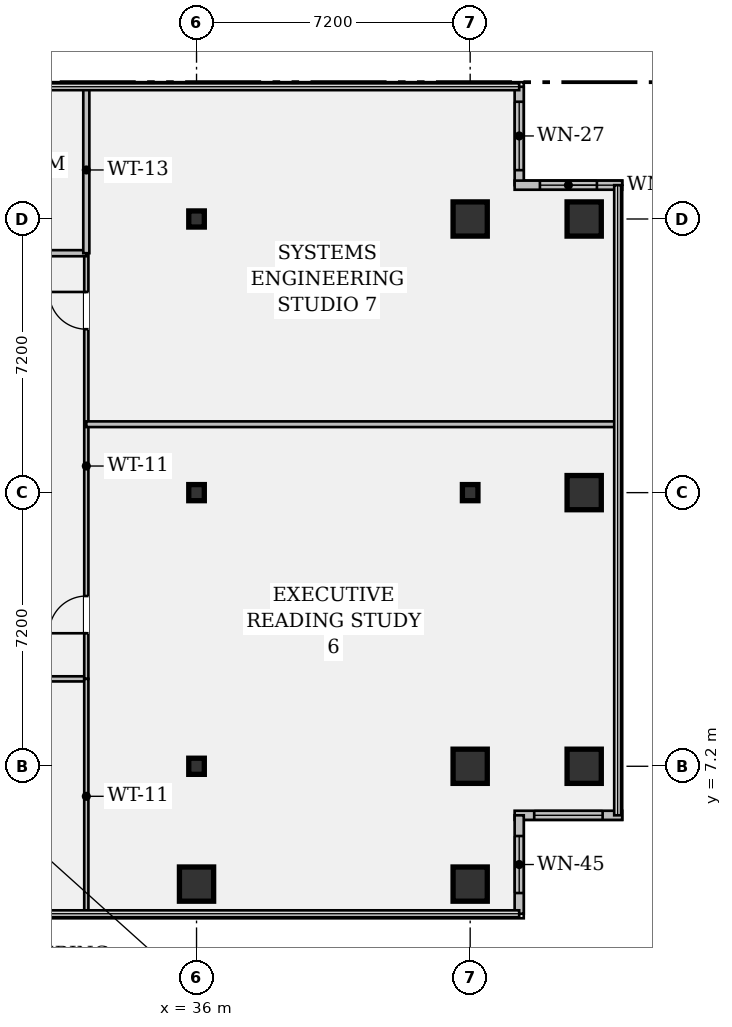
"""IFC4 building model, lengths in metres.
Left out: names, types, materials, properties, quantities, classifications, styles, units other than length and angle.
Written with IfcOpenShell. Run it as: python <this file> out.ifc"""

import sys

from ifc_helpers import new_model, si_unit, direction, frame, frame_2d, origin, origin_2d, place, context, subcontext, project, spatial, rectangle, hollow_rectangle, i_section, extrude, element, fill, save


model = new_model("IFC4")
c1 = context("Model", 3, precision=1e-05, world=origin(), true_north=direction((0.0, 1.0)))
c2 = subcontext(c1, "Body", "Model", "MODEL_VIEW")
j1 = project(units=[si_unit("LENGTHUNIT", "METRE"), si_unit("PLANEANGLEUNIT", "RADIAN")], contexts=[c1])
p1 = place(None, origin())
s1 = spatial("IfcSite", under=j1, at=p1, CompositionType="ELEMENT")
p2 = place(p1, origin())
s2 = spatial("IfcBuilding", under=s1, at=p2, CompositionType="ELEMENT")
p3 = place(p2, frame((0.0, 0.0, 144.55)))
s3 = spatial("IfcBuildingStorey", under=s2, at=p3, CompositionType="ELEMENT", Elevation=144.55)
p4 = place(p3, frame((36.0, 4.1, 0.0), z_axis=(0.0, 0.0, 1.0), x_axis=(1.0, 0.0, 0.0)))
e1 = element("IfcColumn", 1, at=p4, inside=s3, PredefinedType="COLUMN", context=c2, shape_type="SweptSolid", body=[
    extrude(hollow_rectangle(XDim=0.9, YDim=0.9, WallThickness=0.055, at=origin_2d()), origin(), (0.0, 0.0, 1.0), 3.58),
])
for number, where, z_axis, x_axis in (
    (2, (36.0, 7.2, 0.0), (0.0, 0.0, 1.0), (1.0, 0.0, 0.0)),
    (3, (36.0, 14.4, 0.0), (0.0, 0.0, 1.0), (1.0, 0.0, 0.0)),
    (4, (36.0, 21.6, 0.0), (0.0, 0.0, 1.0), (1.0, 0.0, 0.0)),
):
    element("IfcColumn", number, at=place(p3, frame(where, z_axis=z_axis, x_axis=x_axis)), inside=s3, PredefinedType="COLUMN", context=c2, shape_type="SweptSolid", body=[
        extrude(i_section(OverallWidth=0.409, OverallDepth=0.424, WebThickness=0.033, FlangeThickness=0.052, FilletRadius=0.018, at=origin_2d()), origin(), (0.0, 0.0, 1.0), 3.58),
    ])
for number, where, z_axis, x_axis in (
    (5, (43.2, 4.1, 0.0), (0.0, 0.0, 1.0), (1.0, 0.0, 0.0)),
    (6, (43.2, 7.2, 0.0), (0.0, 0.0, 1.0), (1.0, 0.0, 0.0)),
):
    element("IfcColumn", number, at=place(p3, frame(where, z_axis=z_axis, x_axis=x_axis)), inside=s3, PredefinedType="COLUMN", context=c2, shape_type="SweptSolid", body=[
        extrude(hollow_rectangle(XDim=0.9, YDim=0.9, WallThickness=0.055, at=origin_2d()), origin(), (0.0, 0.0, 1.0), 3.58),
    ])
p5 = place(p3, frame((43.2, 14.4, 0.0), z_axis=(0.0, 0.0, 1.0), x_axis=(1.0, 0.0, 0.0)))
e7 = element("IfcColumn", 7, at=p5, inside=s3, PredefinedType="COLUMN", context=c2, shape_type="SweptSolid", body=[
    extrude(i_section(OverallWidth=0.409, OverallDepth=0.424, WebThickness=0.033, FlangeThickness=0.052, FilletRadius=0.018, at=origin_2d()), origin(), (0.0, 0.0, 1.0), 3.58),
])
for number, where, z_axis, x_axis in (
    (8, (43.2, 21.6, 0.0), (0.0, 0.0, 1.0), (1.0, 0.0, 0.0)),
    (9, (46.2, 7.2, 0.0), (0.0, 0.0, 1.0), (1.0, 0.0, 0.0)),
    (10, (46.2, 14.4, 0.0), (0.0, 0.0, 1.0), (1.0, 0.0, 0.0)),
    (11, (46.2, 21.6, 0.0), (0.0, 0.0, 1.0), (1.0, 0.0, 0.0)),
):
    element("IfcColumn", number, at=place(p3, frame(where, z_axis=z_axis, x_axis=x_axis)), inside=s3, PredefinedType="COLUMN", context=c2, shape_type="SweptSolid", body=[
        extrude(hollow_rectangle(XDim=0.9, YDim=0.9, WallThickness=0.055, at=origin_2d()), origin(), (0.0, 0.0, 1.0), 3.58),
    ])
p6 = place(p3, frame((44.49, 25.08, 0.0), z_axis=(0.0, 0.0, 1.0), x_axis=(0.0, -1.0, 0.0)))
e12 = element("IfcWall", 12, at=p6, inside=s3, PredefinedType="STANDARD", context=c2, shape_type="SweptSolid", body=[
    extrude(rectangle(XDim=2.59, YDim=0.24, at=frame_2d((1.295, 0.0))), origin(), (0.0, 0.0, 1.0), 3.58),
])
p7 = place(p6, frame((0.395, 0.0, 0.95)))
e13 = element("IfcOpeningElement", 13, at=p7, cuts=e12, PredefinedType="OPENING", context=c2, shape_type="SweptSolid", body=[
    extrude(rectangle(XDim=1.8, YDim=1.35, at=frame_2d((0.9, 0.675))), frame((0.0, 0.132, 0.0), z_axis=(0.0, -1.0, 0.0), x_axis=(1.0, 0.0, 0.0)), (0.0, 0.0, 1.0), 0.264),
])
p8 = place(p3, frame((44.37, 22.49, 0.0), z_axis=(0.0, 0.0, 1.0), x_axis=(1.0, 0.0, 0.0)))
e14 = element("IfcWall", 14, at=p8, inside=s3, PredefinedType="STANDARD", context=c2, shape_type="SweptSolid", body=[
    extrude(rectangle(XDim=2.83, YDim=0.24, at=frame_2d((1.415, 0.0))), origin(), (0.0, 0.0, 1.0), 3.58),
])
p9 = place(p8, frame((0.665, 0.0, 0.95)))
e15 = element("IfcOpeningElement", 15, at=p9, cuts=e14, PredefinedType="OPENING", context=c2, shape_type="SweptSolid", body=[
    extrude(rectangle(XDim=1.5, YDim=1.8, at=frame_2d((0.75, 0.9))), frame((0.0, 0.132, 0.0), z_axis=(0.0, -1.0, 0.0), x_axis=(1.0, 0.0, 0.0)), (0.0, 0.0, 1.0), 0.264),
])
p10 = place(p3, frame((47.2, 5.91, 0.0), z_axis=(0.0, 0.0, 1.0), x_axis=(-1.0, 0.0, 0.0)))
e16 = element("IfcWall", 16, at=p10, inside=s3, PredefinedType="STANDARD", context=c2, shape_type="SweptSolid", body=[
    extrude(rectangle(XDim=2.83, YDim=0.24, at=frame_2d((1.415, 0.0))), origin(), (0.0, 0.0, 1.0), 3.58),
])
p11 = place(p10, frame((0.515, 0.0, 0.95)))
e17 = element("IfcOpeningElement", 17, at=p11, cuts=e16, PredefinedType="OPENING", context=c2, shape_type="SweptSolid", body=[
    extrude(rectangle(XDim=1.8, YDim=1.35, at=frame_2d((0.9, 0.675))), frame((0.0, 0.132, 0.0), z_axis=(0.0, -1.0, 0.0), x_axis=(1.0, 0.0, 0.0)), (0.0, 0.0, 1.0), 0.264),
])
p12 = place(p3, frame((44.49, 5.91, 0.0), z_axis=(0.0, 0.0, 1.0), x_axis=(0.0, -1.0, 0.0)))
e18 = element("IfcWall", 18, at=p12, inside=s3, PredefinedType="STANDARD", context=c2, shape_type="SweptSolid", body=[
    extrude(rectangle(XDim=2.59, YDim=0.24, at=frame_2d((1.295, 0.0))), origin(), (0.0, 0.0, 1.0), 3.58),
])
p13 = place(p12, frame((0.545, 0.0, 0.95)))
e19 = element("IfcOpeningElement", 19, at=p13, cuts=e18, PredefinedType="OPENING", context=c2, shape_type="SweptSolid", body=[
    extrude(rectangle(XDim=1.5, YDim=1.8, at=frame_2d((0.75, 0.9))), frame((0.0, 0.132, 0.0), z_axis=(0.0, -1.0, 0.0), x_axis=(1.0, 0.0, 0.0)), (0.0, 0.0, 1.0), 0.264),
])
p14 = place(p3, frame((17.35, 9.5, 0.0), z_axis=(0.0, 0.0, 1.0), x_axis=(1.0, 0.0, 0.0)))
e20 = element("IfcWall", 20, at=p14, inside=s3, PredefinedType="PARTITIONING", context=c2, shape_type="SweptSolid", body=[
    extrude(rectangle(XDim=15.75, YDim=0.135, at=frame_2d((7.875, 0.0))), origin(), (0.0, 0.0, 1.0), 2.869),
])
p15 = place(p14, frame((3.73, 0.0, 0.0)))
e21 = element("IfcOpeningElement", 21, at=p15, cuts=e20, PredefinedType="OPENING", context=c2, shape_type="SweptSolid", body=[
    extrude(rectangle(XDim=0.98, YDim=2.15, at=frame_2d((0.49, 1.075))), frame((0.0, 0.08, 0.0), z_axis=(0.0, -1.0, 0.0), x_axis=(1.0, 0.0, 0.0)), (0.0, 0.0, 1.0), 0.159),
])
p16 = place(p14, frame((11.6, 0.0, 0.0)))
e22 = element("IfcOpeningElement", 22, at=p16, cuts=e20, PredefinedType="OPENING", context=c2, shape_type="SweptSolid", body=[
    extrude(rectangle(XDim=0.98, YDim=2.15, at=frame_2d((0.49, 1.075))), frame((0.0, 0.08, 0.0), z_axis=(0.0, -1.0, 0.0), x_axis=(1.0, 0.0, 0.0)), (0.0, 0.0, 1.0), 0.159),
])
p17 = place(p3, frame((33.1, 9.5, 0.0), z_axis=(0.0, 0.0, 1.0), x_axis=(0.0, 1.0, 0.0)))
e23 = element("IfcWall", 23, at=p17, inside=s3, PredefinedType="PARTITIONING", context=c2, shape_type="SweptSolid", body=[
    extrude(rectangle(XDim=11.2, YDim=0.11, at=frame_2d((5.6, 0.0))), origin(), (0.0, 0.0, 1.0), 2.869),
])
p18 = place(p17, frame((1.2, 0.0, 0.0)))
e24 = element("IfcOpeningElement", 24, at=p18, cuts=e23, PredefinedType="OPENING", context=c2, shape_type="SweptSolid", body=[
    extrude(rectangle(XDim=0.98, YDim=2.15, at=frame_2d((0.49, 1.075))), frame((0.0, 0.067, 0.0), z_axis=(0.0, -1.0, 0.0), x_axis=(1.0, 0.0, 0.0)), (0.0, 0.0, 1.0), 0.134),
])
p19 = place(p17, frame((9.2, 0.0, 0.0)))
e25 = element("IfcOpeningElement", 25, at=p19, cuts=e23, PredefinedType="OPENING", context=c2, shape_type="SweptSolid", body=[
    extrude(rectangle(XDim=0.98, YDim=2.15, at=frame_2d((0.49, 1.075))), frame((0.0, 0.067, 0.0), z_axis=(0.0, -1.0, 0.0), x_axis=(1.0, 0.0, 0.0)), (0.0, 0.0, 1.0), 0.134),
])
p20 = place(p3, frame((17.35, 20.7, 0.0), z_axis=(0.0, 0.0, 1.0), x_axis=(1.0, 0.0, 0.0)))
e26 = element("IfcWall", 26, at=p20, inside=s3, PredefinedType="PARTITIONING", context=c2, shape_type="SweptSolid", body=[
    extrude(rectangle(XDim=15.75, YDim=0.16, at=frame_2d((7.875, 0.0))), origin(), (0.0, 0.0, 1.0), 2.869),
])
p21 = place(p20, frame((0.85, 0.0, 0.0)))
e27 = element("IfcOpeningElement", 27, at=p21, cuts=e26, PredefinedType="OPENING", context=c2, shape_type="SweptSolid", body=[
    extrude(rectangle(XDim=0.85, YDim=2.15, at=frame_2d((0.425, 1.075))), frame((0.0, 0.092, 0.0), z_axis=(0.0, -1.0, 0.0), x_axis=(1.0, 0.0, 0.0)), (0.0, 0.0, 1.0), 0.184),
])
p22 = place(p20, frame((4.75, 0.0, 0.0)))
e28 = element("IfcOpeningElement", 28, at=p22, cuts=e26, PredefinedType="OPENING", context=c2, shape_type="SweptSolid", body=[
    extrude(rectangle(XDim=0.85, YDim=2.15, at=frame_2d((0.425, 1.075))), frame((0.0, 0.092, 0.0), z_axis=(0.0, -1.0, 0.0), x_axis=(1.0, 0.0, 0.0)), (0.0, 0.0, 1.0), 0.184),
])
p23 = place(p20, frame((6.81, 0.0, 0.0)))
e29 = element("IfcOpeningElement", 29, at=p23, cuts=e26, PredefinedType="OPENING", context=c2, shape_type="SweptSolid", body=[
    extrude(rectangle(XDim=0.85, YDim=2.15, at=frame_2d((0.425, 1.075))), frame((0.0, 0.092, 0.0), z_axis=(0.0, -1.0, 0.0), x_axis=(1.0, 0.0, 0.0)), (0.0, 0.0, 1.0), 0.184),
])
p24 = place(p20, frame((9.21, 0.0, 0.0)))
e30 = element("IfcOpeningElement", 30, at=p24, cuts=e26, PredefinedType="OPENING", context=c2, shape_type="SweptSolid", body=[
    extrude(rectangle(XDim=0.98, YDim=2.15, at=frame_2d((0.49, 1.075))), frame((0.0, 0.092, 0.0), z_axis=(0.0, -1.0, 0.0), x_axis=(1.0, 0.0, 0.0)), (0.0, 0.0, 1.0), 0.184),
])
p25 = place(p3, frame((33.1, 3.32, 0.0), z_axis=(0.0, 0.0, 1.0), x_axis=(0.0, 1.0, 0.0)))
e31 = element("IfcWall", 31, at=p25, inside=s3, PredefinedType="PARTITIONING", context=c2, shape_type="SweptSolid", body=[
    extrude(rectangle(XDim=6.18, YDim=0.11, at=frame_2d((3.09, 0.0))), origin(), (0.0, 0.0, 1.0), 2.869),
])
p26 = place(p3, frame((33.1, 20.7, 0.0), z_axis=(0.0, 0.0, 1.0), x_axis=(0.0, 1.0, 0.0)))
e32 = element("IfcWall", 32, at=p26, inside=s3, PredefinedType="PARTITIONING", context=c2, shape_type="SweptSolid", body=[
    extrude(rectangle(XDim=4.38, YDim=0.16, at=frame_2d((2.19, 0.0))), origin(), (0.0, 0.0, 1.0), 2.869),
])
p27 = place(p3, frame((33.1, 16.2, 0.0), z_axis=(0.0, 0.0, 1.0), x_axis=(1.0, 0.0, 0.0)))
e33 = element("IfcWall", 33, at=p27, inside=s3, PredefinedType="PARTITIONING", context=c2, shape_type="SweptSolid", body=[
    extrude(rectangle(XDim=13.98, YDim=0.15, at=frame_2d((6.99, 0.0))), origin(), (0.0, 0.0, 1.0), 2.869),
])
p28 = place(p7, origin())
e34 = element("IfcWindow", 34, at=p28, inside=s3, PartitioningType="SINGLE_PANEL", PredefinedType="WINDOW", context=c2, shape_type="SweptSolid", body=[
    extrude(rectangle(XDim=1.8, YDim=1.35, at=frame_2d((0.9, 0.675))), frame((0.0, 0.03, 0.0), z_axis=(0.0, -1.0, 0.0), x_axis=(1.0, 0.0, 0.0)), (0.0, 0.0, 1.0), 0.06),
])
fill(e13, e34)
p29 = place(p9, origin())
e35 = element("IfcWindow", 35, at=p29, inside=s3, PartitioningType="SINGLE_PANEL", PredefinedType="WINDOW", context=c2, shape_type="SweptSolid", body=[
    extrude(rectangle(XDim=1.5, YDim=1.8, at=frame_2d((0.75, 0.9))), frame((0.0, 0.03, 0.0), z_axis=(0.0, -1.0, 0.0), x_axis=(1.0, 0.0, 0.0)), (0.0, 0.0, 1.0), 0.06),
])
fill(e15, e35)
p30 = place(p11, origin())
e36 = element("IfcWindow", 36, at=p30, inside=s3, PartitioningType="SINGLE_PANEL", PredefinedType="WINDOW", context=c2, shape_type="SweptSolid", body=[
    extrude(rectangle(XDim=1.8, YDim=1.35, at=frame_2d((0.9, 0.675))), frame((0.0, 0.03, 0.0), z_axis=(0.0, -1.0, 0.0), x_axis=(1.0, 0.0, 0.0)), (0.0, 0.0, 1.0), 0.06),
])
fill(e17, e36)
p31 = place(p13, origin())
e37 = element("IfcWindow", 37, at=p31, inside=s3, PartitioningType="SINGLE_PANEL", PredefinedType="WINDOW", context=c2, shape_type="SweptSolid", body=[
    extrude(rectangle(XDim=1.5, YDim=1.8, at=frame_2d((0.75, 0.9))), frame((0.0, 0.03, 0.0), z_axis=(0.0, -1.0, 0.0), x_axis=(1.0, 0.0, 0.0)), (0.0, 0.0, 1.0), 0.06),
])
fill(e19, e37)
p32 = place(p18, origin())
e38 = element("IfcDoor", 38, at=p32, inside=s3, OperationType="SINGLE_SWING_LEFT", PredefinedType="DOOR", context=c2, shape_type="SweptSolid", body=[
    extrude(rectangle(XDim=0.98, YDim=2.15, at=frame_2d((0.49, 1.075))), frame((0.0, 0.025, 0.0), z_axis=(0.0, -1.0, 0.0), x_axis=(1.0, 0.0, 0.0)), (0.0, 0.0, 1.0), 0.05),
])
fill(e24, e38)
p33 = place(p19, origin())
e39 = element("IfcDoor", 39, at=p33, inside=s3, OperationType="SINGLE_SWING_RIGHT", PredefinedType="DOOR", context=c2, shape_type="SweptSolid", body=[
    extrude(rectangle(XDim=0.98, YDim=2.15, at=frame_2d((0.49, 1.075))), frame((0.0, 0.025, 0.0), z_axis=(0.0, -1.0, 0.0), x_axis=(1.0, 0.0, 0.0)), (0.0, 0.0, 1.0), 0.05),
])
fill(e25, e39)
save(model, sys.argv[1])
